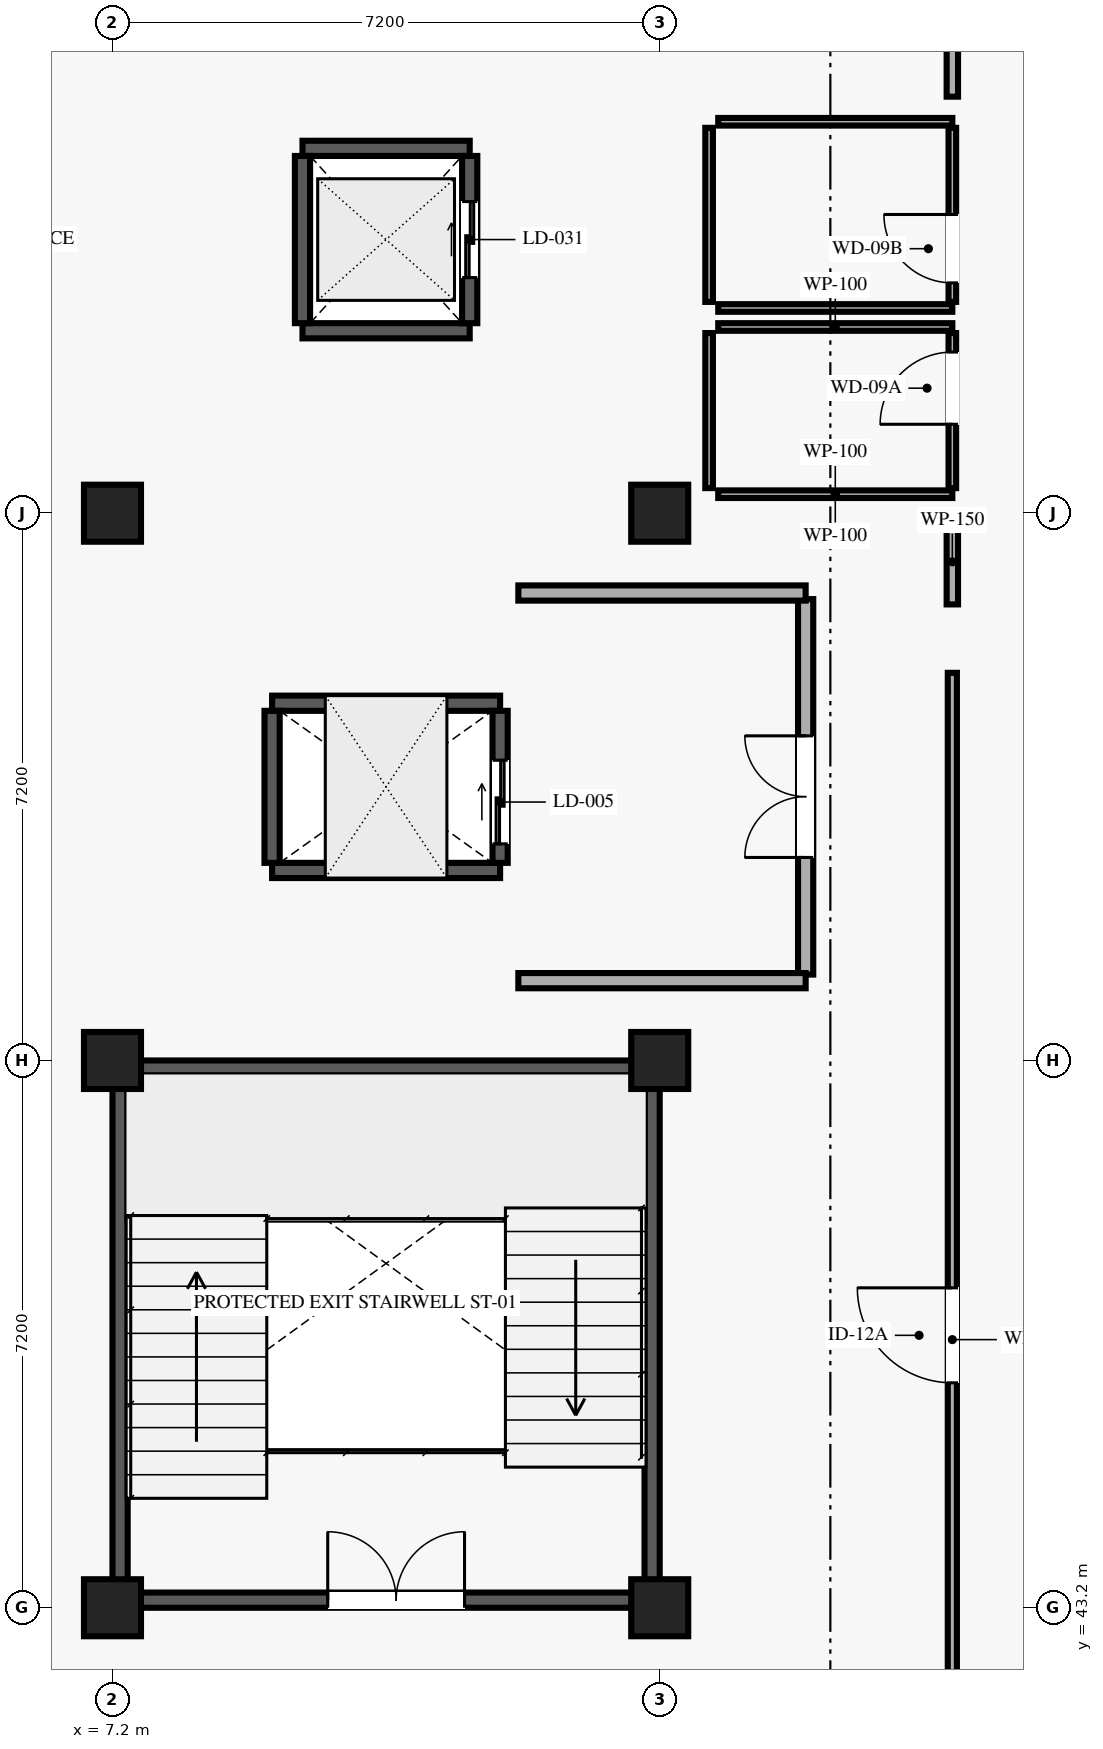
"""IFC4 building model, lengths in metres.
Left out: names, types, materials, properties, quantities, classifications, styles, units other than length and angle.
Written with IfcOpenShell. Run it as: python <this file> out.ifc"""

import sys

from ifc_helpers import new_model, si_unit, direction, frame, frame_2d, origin, origin_2d, place, context, subcontext, project, spatial, rectangle, extrude, element, fill, save


model = new_model("IFC4")
c1 = context("Model", 3, precision=1e-05, world=origin(), true_north=direction((0.0, 1.0)))
c2 = subcontext(c1, "Body", "Model", "MODEL_VIEW")
j1 = project(units=[si_unit("LENGTHUNIT", "METRE"), si_unit("PLANEANGLEUNIT", "RADIAN")], contexts=[c1])
p1 = place(None, origin())
s1 = spatial("IfcSite", under=j1, at=p1, CompositionType="ELEMENT")
p2 = place(p1, origin())
s2 = spatial("IfcBuilding", under=s1, at=p2, CompositionType="ELEMENT")
p3 = place(p2, frame((0.0, 0.0, 13.5)))
s3 = spatial("IfcBuildingStorey", under=s2, at=p3, CompositionType="ELEMENT", Elevation=13.5)
for number, where, z_axis, x_axis in (
    (1, (7.2, 43.2, 0.0), (0.0, 0.0, 1.0), (1.0, 0.0, 0.0)),
    (2, (7.2, 50.4, 0.0), (0.0, 0.0, 1.0), (1.0, 0.0, 0.0)),
    (3, (7.2, 57.6, 0.0), (0.0, 0.0, 1.0), (1.0, 0.0, 0.0)),
    (4, (14.4, 43.2, 0.0), (0.0, 0.0, 1.0), (1.0, 0.0, 0.0)),
    (5, (14.4, 50.4, 0.0), (0.0, 0.0, 1.0), (1.0, 0.0, 0.0)),
    (6, (14.4, 57.6, 0.0), (0.0, 0.0, 1.0), (1.0, 0.0, 0.0)),
):
    element("IfcColumn", number, at=place(p3, frame(where, z_axis=z_axis, x_axis=x_axis)), inside=s3, PredefinedType="COLUMN", context=c2, shape_type="SweptSolid", body=[
        extrude(rectangle(XDim=0.75, YDim=0.75, at=origin_2d()), origin(), (0.0, 0.0, 1.0), 4.05),
    ])
p4 = place(p3, frame((7.4, 43.3, 0.0), z_axis=(0.0, 0.0, 1.0), x_axis=(1.0, 0.0, 0.0)))
e7 = element("IfcWall", 7, at=p4, inside=s3, PredefinedType="SHEAR", context=c2, shape_type="SweptSolid", body=[
    extrude(rectangle(XDim=6.8, YDim=0.2, at=frame_2d((3.4, 0.0))), origin(), (0.0, 0.0, 1.0), 3.81),
])
p5 = place(p4, frame((2.632, 0.0, 0.0)))
e8 = element("IfcOpeningElement", 8, at=p5, cuts=e7, PredefinedType="OPENING", context=c2, shape_type="SweptSolid", body=[
    extrude(rectangle(XDim=1.8, YDim=2.2, at=frame_2d((0.9, 1.1))), frame((0.0, 0.11, 0.0), z_axis=(0.0, -1.0, 0.0), x_axis=(1.0, 0.0, 0.0)), (0.0, 0.0, 1.0), 0.22),
])
for number, where, z_axis, x_axis in (
    (9, (7.4, 50.3, 0.0), (0.0, 0.0, 1.0), (1.0, 0.0, 0.0)),
    (10, (7.3, 43.4, 0.0), (0.0, 0.0, 1.0), (0.0, 1.0, 0.0)),
    (11, (14.3, 43.4, 0.0), (0.0, 0.0, 1.0), (0.0, 1.0, 0.0)),
):
    element("IfcWall", number, at=place(p3, frame(where, z_axis=z_axis, x_axis=x_axis)), inside=s3, PredefinedType="SHEAR", context=c2, shape_type="SweptSolid", body=[
        extrude(rectangle(XDim=6.8, YDim=0.2, at=frame_2d((3.4, 0.0))), origin(), (0.0, 0.0, 1.0), 3.81),
    ])
for number, where, z_axis, x_axis in (
    (12, (9.3, 52.9, 0.0), (0.0, 0.0, 1.0), (1.0, 0.0, 0.0)),
    (13, (9.3, 55.1, 0.0), (0.0, 0.0, 1.0), (1.0, 0.0, 0.0)),
):
    element("IfcWall", number, at=place(p3, frame(where, z_axis=z_axis, x_axis=x_axis)), inside=s3, PredefinedType="SHEAR", context=c2, shape_type="SweptSolid", body=[
        extrude(rectangle(XDim=3.0, YDim=0.2, at=frame_2d((1.5, 0.0))), origin(), (0.0, 0.0, 1.0), 3.81),
    ])
p6 = place(p3, frame((9.3, 53.0, 0.0), z_axis=(0.0, 0.0, 1.0), x_axis=(0.0, 1.0, 0.0)))
e14 = element("IfcWall", 14, at=p6, inside=s3, PredefinedType="SHEAR", context=c2, shape_type="SweptSolid", body=[
    extrude(rectangle(XDim=2.0, YDim=0.2, at=frame_2d((1.0, 0.0))), origin(), (0.0, 0.0, 1.0), 3.81),
])
p7 = place(p3, frame((12.3, 53.0, 0.0), z_axis=(0.0, 0.0, 1.0), x_axis=(0.0, 1.0, 0.0)))
e15 = element("IfcWall", 15, at=p7, inside=s3, PredefinedType="SHEAR", context=c2, shape_type="SweptSolid", body=[
    extrude(rectangle(XDim=2.0, YDim=0.2, at=frame_2d((1.0, 0.0))), origin(), (0.0, 0.0, 1.0), 3.81),
])
p8 = place(p7, frame((0.25, 0.0, 0.0)))
e16 = element("IfcOpeningElement", 16, at=p8, cuts=e15, PredefinedType="OPENING", context=c2, shape_type="SweptSolid", body=[
    extrude(rectangle(XDim=1.1, YDim=2.15, at=frame_2d((0.55, 1.075))), frame((0.0, 0.11, 0.0), z_axis=(0.0, -1.0, 0.0), x_axis=(1.0, 0.0, 0.0)), (0.0, 0.0, 1.0), 0.22),
])
for number, where, z_axis, x_axis in (
    (17, (9.7, 60.0, 0.0), (0.0, 0.0, 1.0), (1.0, 0.0, 0.0)),
    (18, (9.7, 62.4, 0.0), (0.0, 0.0, 1.0), (1.0, 0.0, 0.0)),
    (19, (9.7, 60.1, 0.0), (0.0, 0.0, 1.0), (0.0, 1.0, 0.0)),
):
    element("IfcWall", number, at=place(p3, frame(where, z_axis=z_axis, x_axis=x_axis)), inside=s3, PredefinedType="SHEAR", context=c2, shape_type="SweptSolid", body=[
        extrude(rectangle(XDim=2.2, YDim=0.2, at=frame_2d((1.1, 0.0))), origin(), (0.0, 0.0, 1.0), 3.81),
    ])
p9 = place(p3, frame((11.9, 60.1, 0.0), z_axis=(0.0, 0.0, 1.0), x_axis=(0.0, 1.0, 0.0)))
e20 = element("IfcWall", 20, at=p9, inside=s3, PredefinedType="SHEAR", context=c2, shape_type="SweptSolid", body=[
    extrude(rectangle(XDim=2.2, YDim=0.2, at=frame_2d((1.1, 0.0))), origin(), (0.0, 0.0, 1.0), 3.81),
])
p10 = place(p9, frame((0.6, 0.0, 0.0)))
e21 = element("IfcOpeningElement", 21, at=p10, cuts=e20, PredefinedType="OPENING", context=c2, shape_type="SweptSolid", body=[
    extrude(rectangle(XDim=1.0, YDim=2.1, at=frame_2d((0.5, 1.05))), frame((0.0, 0.11, 0.0), z_axis=(0.0, -1.0, 0.0), x_axis=(1.0, 0.0, 0.0)), (0.0, 0.0, 1.0), 0.22),
])
p11 = place(p3, frame((16.32, 51.53, 0.0), z_axis=(0.0, 0.0, 1.0), x_axis=(0.0, 1.0, 0.0)))
e22 = element("IfcWall", 22, at=p11, inside=s3, PredefinedType="SOLIDWALL", context=c2, shape_type="SweptSolid", body=[
    extrude(rectangle(XDim=4.94, YDim=0.2, at=frame_2d((2.47, 0.0))), origin(), (0.0, 0.0, 1.0), 3.81),
])
p12 = place(p11, frame((1.541, 0.0, 0.0)))
e23 = element("IfcOpeningElement", 23, at=p12, cuts=e22, PredefinedType="OPENING", context=c2, shape_type="SweptSolid", body=[
    extrude(rectangle(XDim=1.6, YDim=2.2, at=frame_2d((0.8, 1.1))), frame((0.0, 0.11, 0.0), z_axis=(0.0, -1.0, 0.0), x_axis=(1.0, 0.0, 0.0)), (0.0, 0.0, 1.0), 0.22),
])
for number, where, z_axis, x_axis in (
    (24, (12.54, 51.45, 0.0), (0.0, 0.0, 1.0), (1.0, 0.0, 0.0)),
    (25, (12.54, 56.55, 0.0), (0.0, 0.0, 1.0), (1.0, 0.0, 0.0)),
):
    element("IfcWall", number, at=place(p3, frame(where, z_axis=z_axis, x_axis=x_axis)), inside=s3, PredefinedType="SOLIDWALL", context=c2, shape_type="SweptSolid", body=[
        extrude(rectangle(XDim=3.78, YDim=0.2, at=frame_2d((1.89, 0.0))), origin(), (0.0, 0.0, 1.0), 3.81),
    ])
p13 = place(p3, frame((18.25, 57.93, 0.0), z_axis=(0.0, 0.0, 1.0), x_axis=(0.0, 1.0, 0.0)))
e26 = element("IfcWall", 26, at=p13, inside=s3, PredefinedType="PARTITIONING", context=c2, shape_type="SweptSolid", body=[
    extrude(rectangle(XDim=2.04, YDim=0.1, at=frame_2d((1.02, 0.0))), origin(), (0.0, 0.0, 1.0), 3.81),
])
p14 = place(p13, frame((0.84, 0.0, 0.0)))
e27 = element("IfcOpeningElement", 27, at=p14, cuts=e26, PredefinedType="OPENING", context=c2, shape_type="SweptSolid", body=[
    extrude(rectangle(XDim=0.95, YDim=2.1, at=frame_2d((0.475, 1.05))), frame((0.0, 0.06, 0.0), z_axis=(0.0, -1.0, 0.0), x_axis=(1.0, 0.0, 0.0)), (0.0, 0.0, 1.0), 0.12),
])
p15 = place(p3, frame((15.17, 57.85, 0.0), z_axis=(0.0, 0.0, 1.0), x_axis=(1.0, 0.0, 0.0)))
e28 = element("IfcWall", 28, at=p15, inside=s3, PredefinedType="PARTITIONING", context=c2, shape_type="SweptSolid", body=[
    extrude(rectangle(XDim=3.08, YDim=0.1, at=frame_2d((1.54, 0.0))), origin(), (0.0, 0.0, 1.0), 3.2),
])
p16 = place(p3, frame((15.17, 60.05, 0.0), z_axis=(0.0, 0.0, 1.0), x_axis=(1.0, 0.0, 0.0)))
e29 = element("IfcWall", 29, at=p16, inside=s3, PredefinedType="PARTITIONING", context=c2, shape_type="SweptSolid", body=[
    extrude(rectangle(XDim=3.08, YDim=0.1, at=frame_2d((1.54, 0.0))), origin(), (0.0, 0.0, 1.0), 3.81),
])
p17 = place(p3, frame((15.05, 57.93, 0.0), z_axis=(0.0, 0.0, 1.0), x_axis=(0.0, 1.0, 0.0)))
e30 = element("IfcWall", 30, at=p17, inside=s3, PredefinedType="PARTITIONING", context=c2, shape_type="SweptSolid", body=[
    extrude(rectangle(XDim=2.04, YDim=0.1, at=frame_2d((1.02, 0.0))), origin(), (0.0, 0.0, 1.0), 3.81),
])
p18 = place(p3, frame((18.25, 60.38, 0.0), z_axis=(0.0, 0.0, 1.0), x_axis=(0.0, 1.0, 0.0)))
e31 = element("IfcWall", 31, at=p18, inside=s3, PredefinedType="PARTITIONING", context=c2, shape_type="SweptSolid", body=[
    extrude(rectangle(XDim=2.29, YDim=0.1, at=frame_2d((1.145, 0.0))), origin(), (0.0, 0.0, 1.0), 3.81),
])
p19 = place(p18, frame((0.25, 0.0, 0.0)))
e32 = element("IfcOpeningElement", 32, at=p19, cuts=e31, PredefinedType="OPENING", context=c2, shape_type="SweptSolid", body=[
    extrude(rectangle(XDim=0.9, YDim=2.1, at=frame_2d((0.45, 1.05))), frame((0.0, 0.06, 0.0), z_axis=(0.0, -1.0, 0.0), x_axis=(1.0, 0.0, 0.0)), (0.0, 0.0, 1.0), 0.12),
])
for number, where, z_axis, x_axis in (
    (33, (15.17, 60.3, 0.0), (0.0, 0.0, 1.0), (1.0, 0.0, 0.0)),
    (34, (15.17, 62.75, 0.0), (0.0, 0.0, 1.0), (1.0, 0.0, 0.0)),
):
    element("IfcWall", number, at=place(p3, frame(where, z_axis=z_axis, x_axis=x_axis)), inside=s3, PredefinedType="PARTITIONING", context=c2, shape_type="SweptSolid", body=[
        extrude(rectangle(XDim=3.08, YDim=0.1, at=frame_2d((1.54, 0.0))), origin(), (0.0, 0.0, 1.0), 3.81),
    ])
p20 = place(p3, frame((15.05, 60.38, 0.0), z_axis=(0.0, 0.0, 1.0), x_axis=(0.0, 1.0, 0.0)))
e35 = element("IfcWall", 35, at=p20, inside=s3, PredefinedType="PARTITIONING", context=c2, shape_type="SweptSolid", body=[
    extrude(rectangle(XDim=2.29, YDim=0.1, at=frame_2d((1.145, 0.0))), origin(), (0.0, 0.0, 1.0), 3.81),
])
p21 = place(p3, frame((18.25, 36.55, 0.0), z_axis=(0.0, 0.0, 1.0), x_axis=(0.0, 1.0, 0.0)))
e36 = element("IfcWall", 36, at=p21, inside=s3, PredefinedType="PARTITIONING", context=c2, shape_type="SweptSolid", body=[
    extrude(rectangle(XDim=18.95, YDim=0.12, at=frame_2d((9.475, 0.0))), origin(), (0.0, 0.0, 1.0), 3.81),
])
p22 = place(p21, frame((9.609, 0.0, 0.0)))
e37 = element("IfcOpeningElement", 37, at=p22, cuts=e36, PredefinedType="OPENING", context=c2, shape_type="SweptSolid", body=[
    extrude(rectangle(XDim=1.25, YDim=2.2, at=frame_2d((0.625, 1.1))), frame((0.0, 0.07, 0.0), z_axis=(0.0, -1.0, 0.0), x_axis=(1.0, 0.0, 0.0)), (0.0, 0.0, 1.0), 0.14),
])
p23 = place(p3, frame((18.25, 63.08, 0.0), z_axis=(0.0, 0.0, 1.0), x_axis=(0.0, 1.0, 0.0)))
e38 = element("IfcWall", 38, at=p23, inside=s3, PredefinedType="PARTITIONING", context=c2, shape_type="SweptSolid", body=[
    extrude(rectangle(XDim=8.62, YDim=0.15, at=frame_2d((4.31, 0.0))), origin(), (0.0, 0.0, 1.0), 3.81),
])
p24 = place(p23, frame((4.607, 0.0, 0.0)))
e39 = element("IfcOpeningElement", 39, at=p24, cuts=e38, PredefinedType="OPENING", context=c2, shape_type="SweptSolid", body=[
    extrude(rectangle(XDim=1.2, YDim=2.15, at=frame_2d((0.6, 1.075))), frame((0.0, 0.085, 0.0), z_axis=(0.0, -1.0, 0.0), x_axis=(1.0, 0.0, 0.0)), (0.0, 0.0, 1.0), 0.17),
])
p25 = place(p3, frame((18.25, 56.4, 0.0), z_axis=(0.0, 0.0, 1.0), x_axis=(0.0, 1.0, 0.0)))
e40 = element("IfcWall", 40, at=p25, inside=s3, PredefinedType="PARTITIONING", context=c2, shape_type="SweptSolid", body=[
    extrude(rectangle(XDim=1.12, YDim=0.15, at=frame_2d((0.56, 0.0))), origin(), (0.0, 0.0, 1.0), 3.81),
])
p26 = place(p5, origin())
e41 = element("IfcDoor", 41, at=p26, inside=s3, OperationType="DOUBLE_DOOR_SINGLE_SWING", PredefinedType="DOOR", context=c2, shape_type="SweptSolid", body=[
    extrude(rectangle(XDim=1.8, YDim=2.2, at=frame_2d((0.9, 1.1))), frame((0.0, 0.025, 0.0), z_axis=(0.0, -1.0, 0.0), x_axis=(1.0, 0.0, 0.0)), (0.0, 0.0, 1.0), 0.05),
])
fill(e8, e41)
p27 = place(p8, origin())
e42 = element("IfcDoor", 42, at=p27, inside=s3, OperationType="DOUBLE_DOOR_SLIDING", PredefinedType="DOOR", context=c2, shape_type="SweptSolid", body=[
    extrude(rectangle(XDim=1.1, YDim=2.15, at=frame_2d((0.55, 1.075))), frame((0.0, 0.025, 0.0), z_axis=(0.0, -1.0, 0.0), x_axis=(1.0, 0.0, 0.0)), (0.0, 0.0, 1.0), 0.05),
])
fill(e16, e42)
p28 = place(p10, origin())
e43 = element("IfcDoor", 43, at=p28, inside=s3, OperationType="DOUBLE_DOOR_SLIDING", PredefinedType="DOOR", context=c2, shape_type="SweptSolid", body=[
    extrude(rectangle(XDim=1.0, YDim=2.1, at=frame_2d((0.5, 1.05))), frame((0.0, 0.025, 0.0), z_axis=(0.0, -1.0, 0.0), x_axis=(1.0, 0.0, 0.0)), (0.0, 0.0, 1.0), 0.05),
])
fill(e21, e43)
p29 = place(p12, origin())
e44 = element("IfcDoor", 44, at=p29, inside=s3, OperationType="DOUBLE_DOOR_SINGLE_SWING", PredefinedType="DOOR", context=c2, shape_type="SweptSolid", body=[
    extrude(rectangle(XDim=1.6, YDim=2.2, at=frame_2d((0.8, 1.1))), frame((0.0, 0.025, 0.0), z_axis=(0.0, -1.0, 0.0), x_axis=(1.0, 0.0, 0.0)), (0.0, 0.0, 1.0), 0.05),
])
fill(e23, e44)
p30 = place(p14, origin())
e45 = element("IfcDoor", 45, at=p30, inside=s3, OperationType="SINGLE_SWING_LEFT", PredefinedType="DOOR", context=c2, shape_type="SweptSolid", body=[
    extrude(rectangle(XDim=0.95, YDim=2.1, at=frame_2d((0.475, 1.05))), frame((0.0, 0.025, 0.0), z_axis=(0.0, -1.0, 0.0), x_axis=(1.0, 0.0, 0.0)), (0.0, 0.0, 1.0), 0.05),
])
fill(e27, e45)
p31 = place(p19, origin())
e46 = element("IfcDoor", 46, at=p31, inside=s3, OperationType="SINGLE_SWING_RIGHT", PredefinedType="DOOR", context=c2, shape_type="SweptSolid", body=[
    extrude(rectangle(XDim=0.9, YDim=2.1, at=frame_2d((0.45, 1.05))), frame((0.0, 0.025, 0.0), z_axis=(0.0, -1.0, 0.0), x_axis=(1.0, 0.0, 0.0)), (0.0, 0.0, 1.0), 0.05),
])
fill(e32, e46)
p32 = place(p22, origin())
e47 = element("IfcDoor", 47, at=p32, inside=s3, OperationType="SINGLE_SWING_RIGHT", PredefinedType="DOOR", context=c2, shape_type="SweptSolid", body=[
    extrude(rectangle(XDim=1.25, YDim=2.2, at=frame_2d((0.625, 1.1))), frame((0.0, 0.025, 0.0), z_axis=(0.0, -1.0, 0.0), x_axis=(1.0, 0.0, 0.0)), (0.0, 0.0, 1.0), 0.05),
])
fill(e37, e47)
save(model, sys.argv[1])
